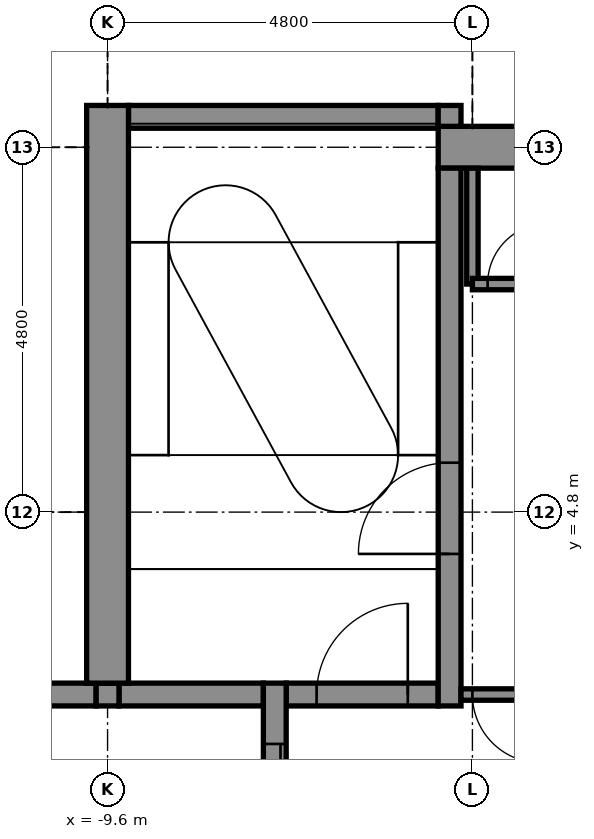
"""IFC4 building model, lengths in metres.
Left out: names, types, materials, properties, quantities, classifications, styles, units other than length and angle.
Written with IfcOpenShell. Run it as: python <this file> out.ifc"""

import sys

from ifc_helpers import new_model, si_unit, direction, frame, frame_2d, origin, place, context, subcontext, project, spatial, rectangle, extrude, element, fill, save


model = new_model("IFC4")
c1 = context("Model", 3, precision=1e-05, world=origin(), true_north=direction((0.0, 1.0)))
c2 = subcontext(c1, "Body", "Model", "MODEL_VIEW")
j1 = project(units=[si_unit("LENGTHUNIT", "METRE"), si_unit("PLANEANGLEUNIT", "RADIAN")], contexts=[c1])
p1 = place(None, origin())
s1 = spatial("IfcSite", under=j1, at=p1, CompositionType="ELEMENT")
p2 = place(p1, origin())
s2 = spatial("IfcBuilding", under=s1, at=p2, CompositionType="ELEMENT")
p3 = place(p2, frame((0.0, 0.0, 238.4)))
s3 = spatial("IfcBuildingStorey", under=s2, at=p3, CompositionType="ELEMENT", Elevation=238.4)
p4 = place(p3, frame((-10.85, 2.4, -0.15), z_axis=(0.0, 0.0, 1.0), x_axis=(1.0, 0.0, 0.0)))
e1 = element("IfcWall", 1, at=p4, inside=s3, PredefinedType="STANDARD", context=c2, shape_type="SweptSolid", body=[
    extrude(rectangle(XDim=1.1, YDim=0.3, at=frame_2d((0.55, 0.0))), origin(), (0.0, 0.0, 1.0), 3.9),
])
p5 = place(p3, frame((-9.45, 2.4, -0.15), z_axis=(0.0, 0.0, 1.0), x_axis=(1.0, 0.0, 0.0)))
e2 = element("IfcWall", 2, at=p5, inside=s3, PredefinedType="STANDARD", context=c2, shape_type="SweptSolid", body=[
    extrude(rectangle(XDim=1.9, YDim=0.3, at=frame_2d((0.95, 0.0))), origin(), (0.0, 0.0, 1.0), 3.9),
])
p6 = place(p3, frame((-7.25, 2.4, -0.15), z_axis=(0.0, 0.0, 1.0), x_axis=(1.0, 0.0, 0.0)))
e3 = element("IfcWall", 3, at=p6, inside=s3, PredefinedType="STANDARD", context=c2, shape_type="SweptSolid", body=[
    extrude(rectangle(XDim=2.0, YDim=0.3, at=frame_2d((1.0, 0.0))), origin(), (0.0, 0.0, 1.0), 3.9),
])
p7 = place(p6, frame((0.4, 0.0, 0.15)))
e4 = element("IfcOpeningElement", 4, at=p7, cuts=e3, PredefinedType="OPENING", context=c2, shape_type="SweptSolid", body=[
    extrude(rectangle(XDim=1.2, YDim=2.1, at=frame_2d((0.6, 1.05))), frame((0.0, 0.16, 0.0), z_axis=(0.0, -1.0, 0.0), x_axis=(1.0, 0.0, 0.0)), (0.0, 0.0, 1.0), 0.32),
])
p8 = place(p3, frame((-5.25, 9.6, -0.15), z_axis=(0.0, 0.0, 1.0), x_axis=(1.0, 0.0, 0.0)))
e5 = element("IfcWall", 5, at=p8, inside=s3, PredefinedType="SHEAR", context=c2, shape_type="SweptSolid", body=[
    extrude(rectangle(XDim=14.575, YDim=0.55, at=frame_2d((7.288, 0.0))), origin(), (0.0, 0.0, 1.0), 3.9),
])
p9 = place(p8, frame((9.35, 0.0, 0.15)))
e6 = element("IfcOpeningElement", 6, at=p9, cuts=e5, PredefinedType="OPENING", context=c2, shape_type="SweptSolid", body=[
    extrude(rectangle(XDim=1.4, YDim=2.1, at=frame_2d((0.7, 1.05))), frame((0.0, 0.285, 0.0), z_axis=(0.0, -1.0, 0.0), x_axis=(1.0, 0.0, 0.0)), (0.0, 0.0, 1.0), 0.57),
])
p10 = place(p3, frame((-9.325, 10.0, -0.15), z_axis=(0.0, 0.0, 1.0), x_axis=(1.0, 0.0, 0.0)))
e7 = element("IfcWall", 7, at=p10, inside=s3, PredefinedType="STANDARD", context=c2, shape_type="SweptSolid", body=[
    extrude(rectangle(XDim=4.075, YDim=0.3, at=frame_2d((2.038, 0.0))), origin(), (0.0, 0.0, 1.0), 3.9),
])
p11 = place(p3, frame((-9.6, 2.25, -0.15), z_axis=(0.0, 0.0, 1.0), x_axis=(0.0, 1.0, 0.0)))
e8 = element("IfcWall", 8, at=p11, inside=s3, PredefinedType="STANDARD", context=c2, shape_type="SweptSolid", body=[
    extrude(rectangle(XDim=0.3, YDim=0.3, at=frame_2d((0.15, 0.0))), origin(), (0.0, 0.0, 1.0), 3.9),
])
p12 = place(p3, frame((-9.6, 2.55, -0.15), z_axis=(0.0, 0.0, 1.0), x_axis=(0.0, 1.0, 0.0)))
e9 = element("IfcWall", 9, at=p12, inside=s3, PredefinedType="SHEAR", context=c2, shape_type="SweptSolid", body=[
    extrude(rectangle(XDim=7.6, YDim=0.55, at=frame_2d((3.8, 0.0))), origin(), (0.0, 0.0, 1.0), 3.9),
])
p13 = place(p3, frame((-7.4, -2.55, -0.15), z_axis=(0.0, 0.0, 1.0), x_axis=(0.0, 1.0, 0.0)))
e10 = element("IfcWall", 10, at=p13, inside=s3, PredefinedType="STANDARD", context=c2, shape_type="SweptSolid", body=[
    extrude(rectangle(XDim=5.1, YDim=0.3, at=frame_2d((2.55, 0.0))), origin(), (0.0, 0.0, 1.0), 3.9),
])
p14 = place(p13, frame((0.8, 0.0, 0.15)))
e11 = element("IfcOpeningElement", 11, at=p14, cuts=e10, PredefinedType="OPENING", context=c2, shape_type="SweptSolid", body=[
    extrude(rectangle(XDim=1.1, YDim=2.1, at=frame_2d((0.55, 1.05))), frame((0.0, 0.16, 0.0), z_axis=(0.0, -1.0, 0.0), x_axis=(1.0, 0.0, 0.0)), (0.0, 0.0, 1.0), 0.32),
])
p15 = place(p13, frame((3.2, 0.0, 0.15)))
e12 = element("IfcOpeningElement", 12, at=p15, cuts=e10, PredefinedType="OPENING", context=c2, shape_type="SweptSolid", body=[
    extrude(rectangle(XDim=1.1, YDim=2.1, at=frame_2d((0.55, 1.05))), frame((0.0, 0.16, 0.0), z_axis=(0.0, -1.0, 0.0), x_axis=(1.0, 0.0, 0.0)), (0.0, 0.0, 1.0), 0.32),
])
p16 = place(p3, frame((-5.1, 2.25, -0.15), z_axis=(0.0, 0.0, 1.0), x_axis=(0.0, 1.0, 0.0)))
e13 = element("IfcWall", 13, at=p16, inside=s3, PredefinedType="STANDARD", context=c2, shape_type="SweptSolid", body=[
    extrude(rectangle(XDim=7.075, YDim=0.3, at=frame_2d((3.538, 0.0))), origin(), (0.0, 0.0, 1.0), 3.9),
])
p17 = place(p16, frame((2.0, 0.0, 0.15)))
e14 = element("IfcOpeningElement", 14, at=p17, cuts=e13, PredefinedType="OPENING", context=c2, shape_type="SweptSolid", body=[
    extrude(rectangle(XDim=1.2, YDim=2.1, at=frame_2d((0.6, 1.05))), frame((0.0, 0.16, 0.0), z_axis=(0.0, -1.0, 0.0), x_axis=(1.0, 0.0, 0.0)), (0.0, 0.0, 1.0), 0.32),
])
p18 = place(p3, frame((-5.1, 9.875, -0.15), z_axis=(0.0, 0.0, 1.0), x_axis=(0.0, 1.0, 0.0)))
e15 = element("IfcWall", 15, at=p18, inside=s3, PredefinedType="STANDARD", context=c2, shape_type="SweptSolid", body=[
    extrude(rectangle(XDim=0.275, YDim=0.3, at=frame_2d((0.137, 0.0))), origin(), (0.0, 0.0, 1.0), 3.9),
])
p19 = place(p3, frame((-4.8, 7.8, 0.0), z_axis=(0.0, 0.0, 1.0), x_axis=(0.0, 1.0, 0.0)))
e16 = element("IfcWall", 16, at=p19, inside=s3, PredefinedType="PARTITIONING", context=c2, shape_type="SweptSolid", body=[
    extrude(rectangle(XDim=1.525, YDim=0.15, at=frame_2d((0.762, 0.0))), origin(), (0.0, 0.0, 1.0), 3.75),
])
p20 = place(p3, frame((-4.8, 7.8, 0.0), z_axis=(0.0, 0.0, 1.0), x_axis=(1.0, 0.0, 0.0)))
e17 = element("IfcWall", 17, at=p20, inside=s3, PredefinedType="PARTITIONING", context=c2, shape_type="SweptSolid", body=[
    extrude(rectangle(XDim=1.05, YDim=0.15, at=frame_2d((0.525, 0.0))), origin(), (0.0, 0.0, 1.0), 3.75),
])
p21 = place(p20, frame((0.2, 0.0, 0.0)))
e18 = element("IfcOpeningElement", 18, at=p21, cuts=e17, PredefinedType="OPENING", context=c2, shape_type="SweptSolid", body=[
    extrude(rectangle(XDim=0.8, YDim=2.1, at=frame_2d((0.4, 1.05))), frame((0.0, 0.085, 0.0), z_axis=(0.0, -1.0, 0.0), x_axis=(1.0, 0.0, 0.0)), (0.0, 0.0, 1.0), 0.17),
])
p22 = place(p3, frame((-4.95, 2.4, 0.0), z_axis=(0.0, 0.0, 1.0), x_axis=(1.0, 0.0, 0.0)))
e19 = element("IfcWall", 19, at=p22, inside=s3, PredefinedType="PARTITIONING", context=c2, shape_type="SweptSolid", body=[
    extrude(rectangle(XDim=1.2, YDim=0.15, at=frame_2d((0.6, 0.0))), origin(), (0.0, 0.0, 1.0), 3.75),
])
p23 = place(p22, frame((0.15, 0.0, 0.0)))
e20 = element("IfcOpeningElement", 20, at=p23, cuts=e19, PredefinedType="OPENING", context=c2, shape_type="SweptSolid", body=[
    extrude(rectangle(XDim=0.9, YDim=2.1, at=frame_2d((0.45, 1.05))), frame((0.0, 0.085, 0.0), z_axis=(0.0, -1.0, 0.0), x_axis=(1.0, 0.0, 0.0)), (0.0, 0.0, 1.0), 0.17),
])
p24 = place(p21, origin())
e21 = element("IfcDoor", 21, at=p24, inside=s3, OperationType="SINGLE_SWING_RIGHT", PredefinedType="DOOR", context=c2, shape_type="SweptSolid", body=[
    extrude(rectangle(XDim=0.8, YDim=2.1, at=frame_2d((0.4, 1.05))), frame((0.0, 0.025, 0.0), z_axis=(0.0, -1.0, 0.0), x_axis=(1.0, 0.0, 0.0)), (0.0, 0.0, 1.0), 0.05),
])
fill(e18, e21)
p25 = place(p15, origin())
e22 = element("IfcDoor", 22, at=p25, inside=s3, OperationType="DOUBLE_DOOR_SLIDING", PredefinedType="DOOR", context=c2, shape_type="SweptSolid", body=[
    extrude(rectangle(XDim=1.1, YDim=2.1, at=frame_2d((0.55, 1.05))), frame((0.0, 0.025, 0.0), z_axis=(0.0, -1.0, 0.0), x_axis=(1.0, 0.0, 0.0)), (0.0, 0.0, 1.0), 0.05),
])
fill(e12, e22)
p26 = place(p17, origin())
e23 = element("IfcDoor", 23, at=p26, inside=s3, OperationType="SINGLE_SWING_LEFT", PredefinedType="DOOR", context=c2, shape_type="SweptSolid", body=[
    extrude(rectangle(XDim=1.2, YDim=2.1, at=frame_2d((0.6, 1.05))), frame((0.0, 0.025, 0.0), z_axis=(0.0, -1.0, 0.0), x_axis=(1.0, 0.0, 0.0)), (0.0, 0.0, 1.0), 0.05),
])
fill(e14, e23)
p27 = place(p23, frame((0.9, 0.0, 0.0), z_axis=(0.0, 0.0, 1.0), x_axis=(-1.0, 0.0, 0.0)))
e24 = element("IfcDoor", 24, at=p27, inside=s3, OperationType="SINGLE_SWING_RIGHT", PredefinedType="DOOR", context=c2, shape_type="SweptSolid", body=[
    extrude(rectangle(XDim=0.9, YDim=2.1, at=frame_2d((0.45, 1.05))), frame((0.0, 0.025, 0.0), z_axis=(0.0, -1.0, 0.0), x_axis=(1.0, 0.0, 0.0)), (0.0, 0.0, 1.0), 0.05),
])
fill(e20, e24)
p28 = place(p7, origin())
e25 = element("IfcDoor", 25, at=p28, inside=s3, OperationType="SINGLE_SWING_RIGHT", PredefinedType="DOOR", context=c2, shape_type="SweptSolid", body=[
    extrude(rectangle(XDim=1.2, YDim=2.1, at=frame_2d((0.6, 1.05))), frame((0.0, 0.025, 0.0), z_axis=(0.0, -1.0, 0.0), x_axis=(1.0, 0.0, 0.0)), (0.0, 0.0, 1.0), 0.05),
])
fill(e4, e25)
save(model, sys.argv[1])
